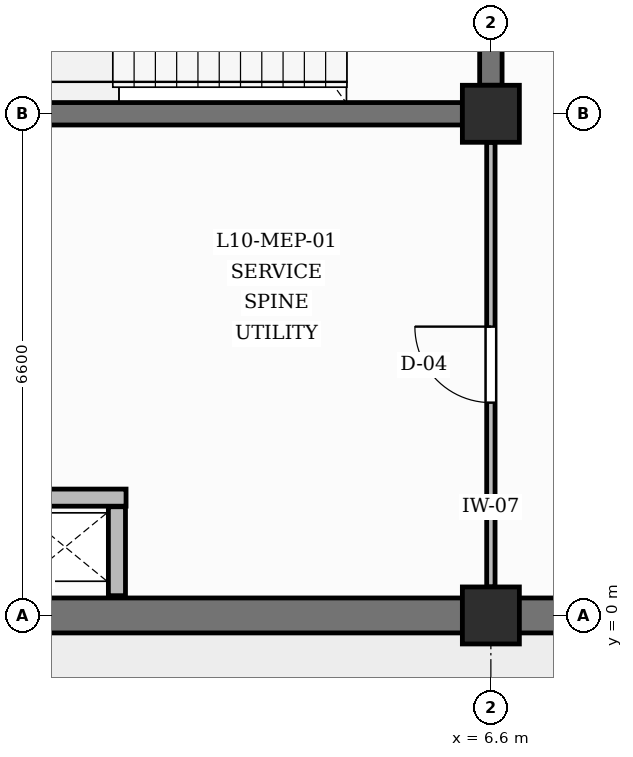
"""IFC4 building model, lengths in metres.
Left out: names, types, materials, properties, quantities, classifications, styles, units other than length and angle.
Written with IfcOpenShell. Run it as: python <this file> out.ifc"""

import sys

from ifc_helpers import new_model, si_unit, direction, frame, frame_2d, origin, origin_2d, place, context, subcontext, project, spatial, rectangle, extrude, element, fill, save


model = new_model("IFC4")
c1 = context("Model", 3, precision=1e-05, world=origin(), true_north=direction((0.0, 1.0)))
c2 = subcontext(c1, "Body", "Model", "MODEL_VIEW")
j1 = project(units=[si_unit("LENGTHUNIT", "METRE"), si_unit("PLANEANGLEUNIT", "RADIAN")], contexts=[c1])
p1 = place(None, origin())
s1 = spatial("IfcSite", under=j1, at=p1, CompositionType="ELEMENT")
p2 = place(p1, origin())
s2 = spatial("IfcBuilding", under=s1, at=p2, CompositionType="ELEMENT")
p3 = place(p2, frame((0.0, 0.0, 43.8)))
s3 = spatial("IfcBuildingStorey", under=s2, at=p3, CompositionType="ELEMENT", Elevation=43.8)
for number, where, z_axis, x_axis in (
    (1, (6.6, 0.0, 0.0), (0.0, 0.0, 1.0), (1.0, 0.0, 0.0)),
    (2, (6.6, 6.6, 0.0), (0.0, 0.0, 1.0), (1.0, 0.0, 0.0)),
):
    element("IfcColumn", number, at=place(p3, frame(where, z_axis=z_axis, x_axis=x_axis)), inside=s3, PredefinedType="COLUMN", context=c2, shape_type="SweptSolid", body=[
        extrude(rectangle(XDim=0.75, YDim=0.75, at=origin_2d()), origin(), (0.0, 0.0, 1.0), 4.2),
    ])
p4 = place(p3, frame((0.375, 0.0, 0.0), z_axis=(0.0, 0.0, 1.0), x_axis=(1.0, 0.0, 0.0)))
e3 = element("IfcWall", 3, at=p4, inside=s3, PredefinedType="SOLIDWALL", context=c2, shape_type="SweptSolid", body=[
    extrude(rectangle(XDim=5.85, YDim=0.46, at=frame_2d((2.925, 0.0))), origin(), (0.0, 0.0, 1.0), 3.29),
])
p5 = place(p3, frame((6.975, 0.0, 0.0), z_axis=(0.0, 0.0, 1.0), x_axis=(1.0, 0.0, 0.0)))
e4 = element("IfcWall", 4, at=p5, inside=s3, PredefinedType="SOLIDWALL", context=c2, shape_type="SweptSolid", body=[
    extrude(rectangle(XDim=5.85, YDim=0.46, at=frame_2d((2.925, 0.0))), origin(), (0.0, 0.0, 1.0), 3.29),
])
p6 = place(p3, frame((0.375, 6.6, 0.0), z_axis=(0.0, 0.0, 1.0), x_axis=(1.0, 0.0, 0.0)))
e5 = element("IfcWall", 5, at=p6, inside=s3, PredefinedType="SHEAR", context=c2, shape_type="SweptSolid", body=[
    extrude(rectangle(XDim=5.85, YDim=0.295, at=frame_2d((2.925, 0.0))), origin(), (0.0, 0.0, 1.0), 3.29),
])
p7 = place(p3, frame((6.6, 6.975, 0.0), z_axis=(0.0, 0.0, 1.0), x_axis=(0.0, 1.0, 0.0)))
e6 = element("IfcWall", 6, at=p7, inside=s3, PredefinedType="SHEAR", context=c2, shape_type="SweptSolid", body=[
    extrude(rectangle(XDim=5.85, YDim=0.295, at=frame_2d((2.925, 0.0))), origin(), (0.0, 0.0, 1.0), 3.29),
])
p8 = place(p7, frame((2.35, 0.0, 0.0)))
e7 = element("IfcOpeningElement", 7, at=p8, cuts=e6, PredefinedType="OPENING", context=c2, shape_type="SweptSolid", body=[
    extrude(rectangle(XDim=1.15, YDim=2.2, at=frame_2d((0.575, 1.1))), frame((0.0, 0.157, 0.0), z_axis=(0.0, -1.0, 0.0), x_axis=(1.0, 0.0, 0.0)), (0.0, 0.0, 1.0), 0.315),
])
p9 = place(p3, frame((1.68, 0.26, 0.0), z_axis=(0.0, 0.0, 1.0), x_axis=(0.0, 1.0, 0.0)))
e8 = element("IfcWall", 8, at=p9, inside=s3, PredefinedType="PARTITIONING", context=c2, shape_type="SweptSolid", body=[
    extrude(rectangle(XDim=1.17, YDim=0.225, at=frame_2d((0.585, 0.0))), origin(), (0.0, 0.0, 1.0), 3.89),
])
p10 = place(p3, frame((0.26, 1.55, 0.0), z_axis=(0.0, 0.0, 1.0), x_axis=(1.0, 0.0, 0.0)))
e9 = element("IfcWall", 9, at=p10, inside=s3, PredefinedType="PARTITIONING", context=c2, shape_type="SweptSolid", body=[
    extrude(rectangle(XDim=1.54, YDim=0.225, at=frame_2d((0.77, 0.0))), origin(), (0.0, 0.0, 1.0), 3.89),
])
p11 = place(p3, frame((6.6, 0.375, 0.0), z_axis=(0.0, 0.0, 1.0), x_axis=(0.0, 1.0, 0.0)))
e10 = element("IfcWall", 10, at=p11, inside=s3, PredefinedType="PARTITIONING", context=c2, shape_type="SweptSolid", body=[
    extrude(rectangle(XDim=5.85, YDim=0.11, at=frame_2d((2.925, 0.0))), origin(), (0.0, 0.0, 1.0), 3.29),
])
p12 = place(p11, frame((2.425, 0.0, 0.0)))
e11 = element("IfcOpeningElement", 11, at=p12, cuts=e10, PredefinedType="OPENING", context=c2, shape_type="SweptSolid", body=[
    extrude(rectangle(XDim=1.0, YDim=2.1, at=frame_2d((0.5, 1.05))), frame((0.0, 0.065, 0.0), z_axis=(0.0, -1.0, 0.0), x_axis=(1.0, 0.0, 0.0)), (0.0, 0.0, 1.0), 0.13),
])
p13 = place(p12, origin())
e12 = element("IfcDoor", 12, at=p13, inside=s3, OperationType="SINGLE_SWING_RIGHT", PredefinedType="DOOR", context=c2, shape_type="SweptSolid", body=[
    extrude(rectangle(XDim=1.0, YDim=2.1, at=frame_2d((0.5, 1.05))), frame((0.0, 0.025, 0.0), z_axis=(0.0, -1.0, 0.0), x_axis=(1.0, 0.0, 0.0)), (0.0, 0.0, 1.0), 0.05),
])
fill(e11, e12)
save(model, sys.argv[1])
